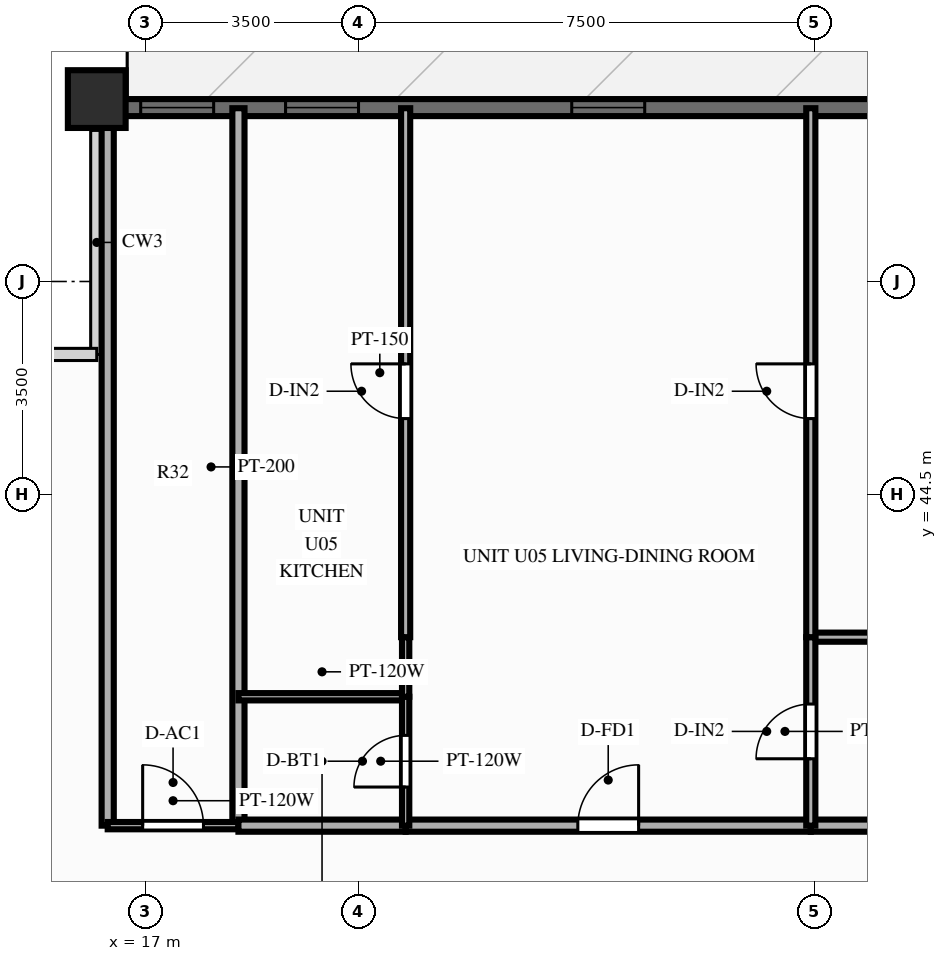
"""IFC4 building model, lengths in metres.
Left out: names, types, materials, properties, quantities, classifications, styles, units other than length and angle.
Written with IfcOpenShell. Run it as: python <this file> out.ifc"""

import sys

from ifc_helpers import new_model, si_unit, direction, frame, frame_2d, origin, origin_2d, place, context, subcontext, project, spatial, rectangle, extrude, source, transform, mapped, element, fill, save


model = new_model("IFC4")
c1 = context("Model", 3, precision=1e-05, world=origin(), true_north=direction((0.0, 1.0)))
c2 = subcontext(c1, "Body", "Model", "MODEL_VIEW")
j1 = project(units=[si_unit("LENGTHUNIT", "METRE"), si_unit("PLANEANGLEUNIT", "RADIAN")], contexts=[c1])
p1 = place(None, origin())
s1 = spatial("IfcSite", under=j1, at=p1, CompositionType="ELEMENT")
p2 = place(p1, origin())
s2 = spatial("IfcBuilding", under=s1, at=p2, CompositionType="ELEMENT")
p3 = place(p2, frame((0.0, 0.0, 80.85)))
s3 = spatial("IfcBuildingStorey", under=s2, at=p3, CompositionType="ELEMENT", Elevation=80.85)
m1 = source(origin(), c2, "Body", "SweptSolid", [
    extrude(rectangle(XDim=0.95, YDim=0.95, at=origin_2d()), origin(), (0.0, 0.0, 1.0), 3.0),
])
p4 = place(p3, frame((16.2, 51.0, 0.0), z_axis=(0.0, 0.0, 1.0), x_axis=(1.0, 0.0, 0.0)))
e1 = element("IfcColumn", 1, at=p4, inside=s3, PredefinedType="COLUMN", context=c2, shape_type="MappedRepresentation", body=[
    mapped(m1, transform((0.0, 0.0, 0.0), scale=1.0)),
])
p5 = place(p3, frame((16.2, 50.86, 0.0), z_axis=(0.0, 0.0, 1.0), x_axis=(1.0, 0.0, 0.0)))
e2 = element("IfcWall", 2, at=p5, inside=s3, PredefinedType="SOLIDWALL", context=c2, shape_type="SweptSolid", body=[
    extrude(rectangle(XDim=43.6, YDim=0.28, at=frame_2d((21.8, 0.0))), origin(), (0.0, 0.0, 1.0), 2.28),
])
p6 = place(p5, frame((0.722, 0.0, 0.25)))
e3 = element("IfcOpeningElement", 3, at=p6, cuts=e2, PredefinedType="OPENING", context=c2, shape_type="SweptSolid", body=[
    extrude(rectangle(XDim=1.2, YDim=1.5, at=frame_2d((0.6, 0.75))), frame((0.0, 0.152, 0.0), z_axis=(0.0, -1.0, 0.0), x_axis=(1.0, 0.0, 0.0)), (0.0, 0.0, 1.0), 0.304),
])
p7 = place(p5, frame((3.105, 0.0, 0.25)))
e4 = element("IfcOpeningElement", 4, at=p7, cuts=e2, PredefinedType="OPENING", context=c2, shape_type="SweptSolid", body=[
    extrude(rectangle(XDim=1.2, YDim=1.5, at=frame_2d((0.6, 0.75))), frame((0.0, 0.152, 0.0), z_axis=(0.0, -1.0, 0.0), x_axis=(1.0, 0.0, 0.0)), (0.0, 0.0, 1.0), 0.304),
])
p8 = place(p5, frame((7.812, 0.0, 0.25)))
e5 = element("IfcOpeningElement", 5, at=p8, cuts=e2, PredefinedType="OPENING", context=c2, shape_type="SweptSolid", body=[
    extrude(rectangle(XDim=1.2, YDim=1.5, at=frame_2d((0.6, 0.75))), frame((0.0, 0.152, 0.0), z_axis=(0.0, -1.0, 0.0), x_axis=(1.0, 0.0, 0.0)), (0.0, 0.0, 1.0), 0.304),
])
p9 = place(p5, frame((12.764, 0.0, 0.25)))
e6 = element("IfcOpeningElement", 6, at=p9, cuts=e2, PredefinedType="OPENING", context=c2, shape_type="SweptSolid", body=[
    extrude(rectangle(XDim=1.2, YDim=1.5, at=frame_2d((0.6, 0.75))), frame((0.0, 0.152, 0.0), z_axis=(0.0, -1.0, 0.0), x_axis=(1.0, 0.0, 0.0)), (0.0, 0.0, 1.0), 0.304),
])
p10 = place(p5, frame((16.71, 0.0, 0.25)))
e7 = element("IfcOpeningElement", 7, at=p10, cuts=e2, PredefinedType="OPENING", context=c2, shape_type="SweptSolid", body=[
    extrude(rectangle(XDim=1.2, YDim=1.5, at=frame_2d((0.6, 0.75))), frame((0.0, 0.152, 0.0), z_axis=(0.0, -1.0, 0.0), x_axis=(1.0, 0.0, 0.0)), (0.0, 0.0, 1.0), 0.304),
])
p11 = place(p5, frame((21.604, 0.0, 0.0)))
e8 = element("IfcOpeningElement", 8, at=p11, cuts=e2, PredefinedType="OPENING", context=c2, shape_type="SweptSolid", body=[
    extrude(rectangle(XDim=1.1, YDim=2.15, at=frame_2d((0.55, 1.075))), frame((0.0, 0.152, 0.0), z_axis=(0.0, -1.0, 0.0), x_axis=(1.0, 0.0, 0.0)), (0.0, 0.0, 1.0), 0.304),
])
p12 = place(p5, frame((26.044, 0.0, 0.25)))
e9 = element("IfcOpeningElement", 9, at=p12, cuts=e2, PredefinedType="OPENING", context=c2, shape_type="SweptSolid", body=[
    extrude(rectangle(XDim=1.2, YDim=1.5, at=frame_2d((0.6, 0.75))), frame((0.0, 0.152, 0.0), z_axis=(0.0, -1.0, 0.0), x_axis=(1.0, 0.0, 0.0)), (0.0, 0.0, 1.0), 0.304),
])
p13 = place(p5, frame((30.306, 0.0, 0.25)))
e10 = element("IfcOpeningElement", 10, at=p13, cuts=e2, PredefinedType="OPENING", context=c2, shape_type="SweptSolid", body=[
    extrude(rectangle(XDim=1.2, YDim=1.5, at=frame_2d((0.6, 0.75))), frame((0.0, 0.152, 0.0), z_axis=(0.0, -1.0, 0.0), x_axis=(1.0, 0.0, 0.0)), (0.0, 0.0, 1.0), 0.304),
])
p14 = place(p5, frame((35.629, 0.0, 0.25)))
e11 = element("IfcOpeningElement", 11, at=p14, cuts=e2, PredefinedType="OPENING", context=c2, shape_type="SweptSolid", body=[
    extrude(rectangle(XDim=1.2, YDim=1.5, at=frame_2d((0.6, 0.75))), frame((0.0, 0.152, 0.0), z_axis=(0.0, -1.0, 0.0), x_axis=(1.0, 0.0, 0.0)), (0.0, 0.0, 1.0), 0.304),
])
p15 = place(p5, frame((40.885, 0.0, 0.25)))
e12 = element("IfcOpeningElement", 12, at=p15, cuts=e2, PredefinedType="OPENING", context=c2, shape_type="SweptSolid", body=[
    extrude(rectangle(XDim=1.2, YDim=1.5, at=frame_2d((0.6, 0.75))), frame((0.0, 0.152, 0.0), z_axis=(0.0, -1.0, 0.0), x_axis=(1.0, 0.0, 0.0)), (0.0, 0.0, 1.0), 0.304),
])
for number, where, z_axis, x_axis in (
    (13, (16.38, 39.05, 0.0), (0.0, 0.0, 1.0), (0.0, 1.0, 0.0)),
    (14, (18.53, 39.05, 0.0), (0.0, 0.0, 1.0), (0.0, 1.0, 0.0)),
):
    element("IfcWall", number, at=place(p3, frame(where, z_axis=z_axis, x_axis=x_axis)), inside=s3, PredefinedType="PARTITIONING", context=c2, shape_type="SweptSolid", body=[
        extrude(rectangle(XDim=11.8, YDim=0.2, at=frame_2d((5.9, 0.0))), origin(), (0.0, 0.0, 1.0), 2.79),
    ])
p16 = place(p3, frame((16.38, 39.05, 0.0), z_axis=(0.0, 0.0, 1.0), x_axis=(1.0, 0.0, 0.0)))
e15 = element("IfcWall", 15, at=p16, inside=s3, PredefinedType="PARTITIONING", context=c2, shape_type="SweptSolid", body=[
    extrude(rectangle(XDim=2.15, YDim=0.12, at=frame_2d((1.075, 0.0))), origin(), (0.0, 0.0, 1.0), 2.79),
])
p17 = place(p16, frame((0.575, 0.0, 0.0)))
e16 = element("IfcOpeningElement", 16, at=p17, cuts=e15, PredefinedType="OPENING", context=c2, shape_type="SweptSolid", body=[
    extrude(rectangle(XDim=1.0, YDim=2.1, at=frame_2d((0.5, 1.05))), frame((0.0, 0.072, 0.0), z_axis=(0.0, -1.0, 0.0), x_axis=(1.0, 0.0, 0.0)), (0.0, 0.0, 1.0), 0.144),
])
p18 = place(p3, frame((18.53, 39.05, 0.0), z_axis=(0.0, 0.0, 1.0), x_axis=(1.0, 0.0, 0.0)))
e17 = element("IfcWall", 17, at=p18, inside=s3, PredefinedType="PARTITIONING", context=c2, shape_type="SweptSolid", body=[
    extrude(rectangle(XDim=2.75, YDim=0.2, at=frame_2d((1.375, 0.0))), origin(), (0.0, 0.0, 1.0), 2.79),
])
p19 = place(p3, frame((21.28, 39.05, 0.0), z_axis=(0.0, 0.0, 1.0), x_axis=(1.0, 0.0, 0.0)))
e18 = element("IfcWall", 18, at=p19, inside=s3, PredefinedType="PARTITIONING", context=c2, shape_type="SweptSolid", body=[
    extrude(rectangle(XDim=6.663, YDim=0.2, at=frame_2d((3.332, 0.0))), origin(), (0.0, 0.0, 1.0), 2.79),
])
p20 = place(p19, frame((2.832, 0.0, 0.0)))
e19 = element("IfcOpeningElement", 19, at=p20, cuts=e18, PredefinedType="OPENING", context=c2, shape_type="SweptSolid", body=[
    extrude(rectangle(XDim=1.0, YDim=2.15, at=frame_2d((0.5, 1.075))), frame((0.0, 0.112, 0.0), z_axis=(0.0, -1.0, 0.0), x_axis=(1.0, 0.0, 0.0)), (0.0, 0.0, 1.0), 0.224),
])
p21 = place(p3, frame((27.943, 39.05, 0.0), z_axis=(0.0, 0.0, 1.0), x_axis=(1.0, 0.0, 0.0)))
e20 = element("IfcWall", 20, at=p21, inside=s3, PredefinedType="PARTITIONING", context=c2, shape_type="SweptSolid", body=[
    extrude(rectangle(XDim=3.736, YDim=0.2, at=frame_2d((1.868, 0.0))), origin(), (0.0, 0.0, 1.0), 2.79),
])
p22 = place(p3, frame((18.53, 41.17, 0.0), z_axis=(0.0, 0.0, 1.0), x_axis=(1.0, 0.0, 0.0)))
e21 = element("IfcWall", 21, at=p22, inside=s3, PredefinedType="PARTITIONING", context=c2, shape_type="SweptSolid", body=[
    extrude(rectangle(XDim=2.75, YDim=0.12, at=frame_2d((1.375, 0.0))), origin(), (0.0, 0.0, 1.0), 2.79),
])
p23 = place(p3, frame((27.943, 42.15, 0.0), z_axis=(0.0, 0.0, 1.0), x_axis=(1.0, 0.0, 0.0)))
e22 = element("IfcWall", 22, at=p23, inside=s3, PredefinedType="PARTITIONING", context=c2, shape_type="SweptSolid", body=[
    extrude(rectangle(XDim=3.736, YDim=0.15, at=frame_2d((1.868, 0.0))), origin(), (0.0, 0.0, 1.0), 2.79),
])
p24 = place(p3, frame((21.28, 39.05, 0.0), z_axis=(0.0, 0.0, 1.0), x_axis=(0.0, 1.0, 0.0)))
e23 = element("IfcWall", 23, at=p24, inside=s3, PredefinedType="PARTITIONING", context=c2, shape_type="SweptSolid", body=[
    extrude(rectangle(XDim=2.12, YDim=0.12, at=frame_2d((1.06, 0.0))), origin(), (0.0, 0.0, 1.0), 2.79),
])
p25 = place(p24, frame((0.635, 0.0, 0.0)))
e24 = element("IfcOpeningElement", 24, at=p25, cuts=e23, PredefinedType="OPENING", context=c2, shape_type="SweptSolid", body=[
    extrude(rectangle(XDim=0.85, YDim=2.05, at=frame_2d((0.425, 1.025))), frame((0.0, 0.072, 0.0), z_axis=(0.0, -1.0, 0.0), x_axis=(1.0, 0.0, 0.0)), (0.0, 0.0, 1.0), 0.144),
])
p26 = place(p3, frame((21.28, 41.17, 0.0), z_axis=(0.0, 0.0, 1.0), x_axis=(0.0, 1.0, 0.0)))
e25 = element("IfcWall", 25, at=p26, inside=s3, PredefinedType="PARTITIONING", context=c2, shape_type="SweptSolid", body=[
    extrude(rectangle(XDim=0.98, YDim=0.12, at=frame_2d((0.49, 0.0))), origin(), (0.0, 0.0, 1.0), 2.79),
])
p27 = place(p3, frame((21.28, 42.15, 0.0), z_axis=(0.0, 0.0, 1.0), x_axis=(0.0, 1.0, 0.0)))
e26 = element("IfcWall", 26, at=p27, inside=s3, PredefinedType="PARTITIONING", context=c2, shape_type="SweptSolid", body=[
    extrude(rectangle(XDim=8.7, YDim=0.15, at=frame_2d((4.35, 0.0))), origin(), (0.0, 0.0, 1.0), 2.79),
])
p28 = place(p27, frame((3.595, 0.0, 0.0)))
e27 = element("IfcOpeningElement", 27, at=p28, cuts=e26, PredefinedType="OPENING", context=c2, shape_type="SweptSolid", body=[
    extrude(rectangle(XDim=0.9, YDim=2.1, at=frame_2d((0.45, 1.05))), frame((0.0, 0.087, 0.0), z_axis=(0.0, -1.0, 0.0), x_axis=(1.0, 0.0, 0.0)), (0.0, 0.0, 1.0), 0.174),
])
p29 = place(p3, frame((27.943, 39.05, 0.0), z_axis=(0.0, 0.0, 1.0), x_axis=(0.0, 1.0, 0.0)))
e28 = element("IfcWall", 28, at=p29, inside=s3, PredefinedType="PARTITIONING", context=c2, shape_type="SweptSolid", body=[
    extrude(rectangle(XDim=3.1, YDim=0.15, at=frame_2d((1.55, 0.0))), origin(), (0.0, 0.0, 1.0), 2.79),
])
p30 = place(p29, frame((1.1, 0.0, 0.0)))
e29 = element("IfcOpeningElement", 29, at=p30, cuts=e28, PredefinedType="OPENING", context=c2, shape_type="SweptSolid", body=[
    extrude(rectangle(XDim=0.9, YDim=2.1, at=frame_2d((0.45, 1.05))), frame((0.0, 0.087, 0.0), z_axis=(0.0, -1.0, 0.0), x_axis=(1.0, 0.0, 0.0)), (0.0, 0.0, 1.0), 0.174),
])
p31 = place(p3, frame((27.943, 42.15, 0.0), z_axis=(0.0, 0.0, 1.0), x_axis=(0.0, 1.0, 0.0)))
e30 = element("IfcWall", 30, at=p31, inside=s3, PredefinedType="PARTITIONING", context=c2, shape_type="SweptSolid", body=[
    extrude(rectangle(XDim=8.7, YDim=0.15, at=frame_2d((4.35, 0.0))), origin(), (0.0, 0.0, 1.0), 2.79),
])
p32 = place(p31, frame((3.595, 0.0, 0.0)))
e31 = element("IfcOpeningElement", 31, at=p32, cuts=e30, PredefinedType="OPENING", context=c2, shape_type="SweptSolid", body=[
    extrude(rectangle(XDim=0.9, YDim=2.1, at=frame_2d((0.45, 1.05))), frame((0.0, 0.087, 0.0), z_axis=(0.0, -1.0, 0.0), x_axis=(1.0, 0.0, 0.0)), (0.0, 0.0, 1.0), 0.174),
])
m2 = source(origin(), c2, "Body", "SweptSolid", [
    extrude(rectangle(XDim=1.2, YDim=1.5, at=frame_2d((0.6, 0.75))), frame((0.0, 0.03, 0.0), z_axis=(0.0, -1.0, 0.0), x_axis=(1.0, 0.0, 0.0)), (0.0, 0.0, 1.0), 0.06),
])
p33 = place(p6, origin())
e32 = element("IfcWindow", 32, at=p33, inside=s3, PartitioningType="SINGLE_PANEL", PredefinedType="WINDOW", context=c2, shape_type="MappedRepresentation", body=[
    mapped(m2, transform((0.0, 0.0, 0.0), scale=1.0)),
])
fill(e3, e32)
p34 = place(p7, origin())
e33 = element("IfcWindow", 33, at=p34, inside=s3, PartitioningType="SINGLE_PANEL", PredefinedType="WINDOW", context=c2, shape_type="MappedRepresentation", body=[
    mapped(m2, transform((0.0, 0.0, 0.0), scale=1.0)),
])
fill(e4, e33)
p35 = place(p8, origin())
e34 = element("IfcWindow", 34, at=p35, inside=s3, PartitioningType="SINGLE_PANEL", PredefinedType="WINDOW", context=c2, shape_type="MappedRepresentation", body=[
    mapped(m2, transform((0.0, 0.0, 0.0), scale=1.0)),
])
fill(e5, e34)
m3 = source(origin(), c2, "Body", "SweptSolid", [
    extrude(rectangle(XDim=1.0, YDim=2.1, at=frame_2d((0.5, 1.05))), frame((0.0, 0.025, 0.0), z_axis=(0.0, -1.0, 0.0), x_axis=(1.0, 0.0, 0.0)), (0.0, 0.0, 1.0), 0.05),
])
p36 = place(p17, origin())
e35 = element("IfcDoor", 35, at=p36, inside=s3, OperationType="SINGLE_SWING_LEFT", PredefinedType="DOOR", context=c2, shape_type="MappedRepresentation", body=[
    mapped(m3, transform((0.0, 0.0, 0.0), scale=1.0)),
])
fill(e16, e35)
m4 = source(origin(), c2, "Body", "SweptSolid", [
    extrude(rectangle(XDim=1.0, YDim=2.15, at=frame_2d((0.5, 1.075))), frame((0.0, 0.025, 0.0), z_axis=(0.0, -1.0, 0.0), x_axis=(1.0, 0.0, 0.0)), (0.0, 0.0, 1.0), 0.05),
])
p37 = place(p20, origin())
e36 = element("IfcDoor", 36, at=p37, inside=s3, OperationType="SINGLE_SWING_RIGHT", PredefinedType="DOOR", context=c2, shape_type="MappedRepresentation", body=[
    mapped(m4, transform((0.0, 0.0, 0.0), scale=1.0)),
])
fill(e19, e36)
m5 = source(origin(), c2, "Body", "SweptSolid", [
    extrude(rectangle(XDim=0.85, YDim=2.05, at=frame_2d((0.425, 1.025))), frame((0.0, 0.025, 0.0), z_axis=(0.0, -1.0, 0.0), x_axis=(1.0, 0.0, 0.0)), (0.0, 0.0, 1.0), 0.05),
])
p38 = place(p25, origin())
e37 = element("IfcDoor", 37, at=p38, inside=s3, OperationType="SINGLE_SWING_LEFT", PredefinedType="DOOR", context=c2, shape_type="MappedRepresentation", body=[
    mapped(m5, transform((0.0, 0.0, 0.0), scale=1.0)),
])
fill(e24, e37)
m6 = source(origin(), c2, "Body", "SweptSolid", [
    extrude(rectangle(XDim=0.9, YDim=2.1, at=frame_2d((0.45, 1.05))), frame((0.0, 0.025, 0.0), z_axis=(0.0, -1.0, 0.0), x_axis=(1.0, 0.0, 0.0)), (0.0, 0.0, 1.0), 0.05),
])
p39 = place(p28, origin())
e38 = element("IfcDoor", 38, at=p39, inside=s3, OperationType="SINGLE_SWING_RIGHT", PredefinedType="DOOR", context=c2, shape_type="MappedRepresentation", body=[
    mapped(m6, transform((0.0, 0.0, 0.0), scale=1.0)),
])
fill(e27, e38)
p40 = place(p30, origin())
e39 = element("IfcDoor", 39, at=p40, inside=s3, OperationType="SINGLE_SWING_LEFT", PredefinedType="DOOR", context=c2, shape_type="MappedRepresentation", body=[
    mapped(m6, transform((0.0, 0.0, 0.0), scale=1.0)),
])
fill(e29, e39)
p41 = place(p32, origin())
e40 = element("IfcDoor", 40, at=p41, inside=s3, OperationType="SINGLE_SWING_RIGHT", PredefinedType="DOOR", context=c2, shape_type="MappedRepresentation", body=[
    mapped(m6, transform((0.0, 0.0, 0.0), scale=1.0)),
])
fill(e31, e40)
save(model, sys.argv[1])
